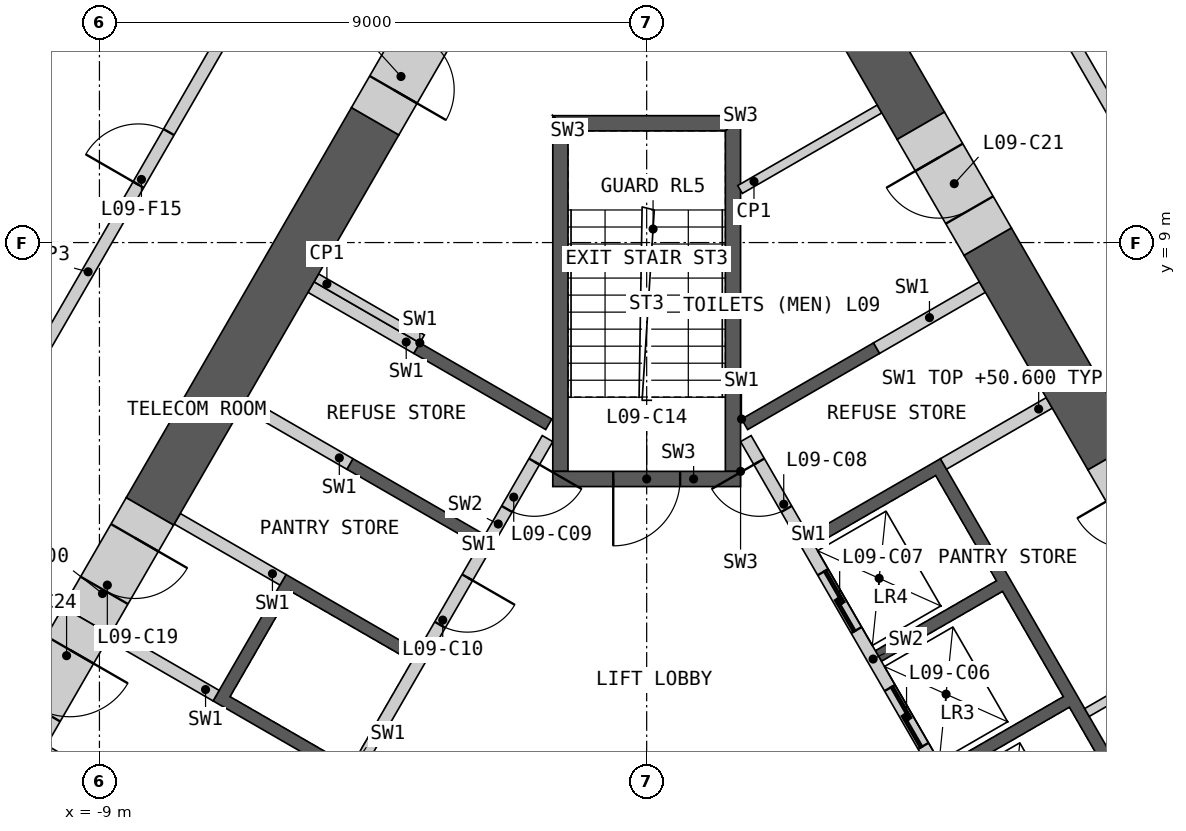
"""IFC4 building model, lengths in metres.
Left out: names, types, materials, properties, quantities, classifications, styles, units other than length and angle.
Written with IfcOpenShell. Run it as: python <this file> out.ifc"""

import sys

from ifc_helpers import new_model, si_unit, direction, frame, frame_2d, origin, place, context, subcontext, project, spatial, polyline, rectangle, outline, extrude, element, fill, save


model = new_model("IFC4")
c1 = context("Model", 3, precision=1e-05, world=origin(), true_north=direction((0.0, 1.0)))
c2 = subcontext(c1, "Body", "Model", "MODEL_VIEW")
j1 = project(units=[si_unit("LENGTHUNIT", "METRE"), si_unit("PLANEANGLEUNIT", "RADIAN")], contexts=[c1])
p1 = place(None, origin())
s1 = spatial("IfcSite", under=j1, at=p1, CompositionType="ELEMENT")
p2 = place(p1, origin())
s2 = spatial("IfcBuilding", under=s1, at=p2, CompositionType="ELEMENT")
p3 = place(p2, frame((0.0, 0.0, 46.8)))
s3 = spatial("IfcBuildingStorey", under=s2, at=p3, CompositionType="ELEMENT", Elevation=46.8)
p4 = place(p3, origin())
e1 = element("IfcWall", 1, at=p4, inside=s3, PredefinedType="SHEAR", context=c2, shape_type="SweptSolid", body=[
    extrude(outline(polyline([(1.561, 6.097), (3.731, 7.35), (3.831, 7.177), (1.66, 5.924), (1.561, 6.097)])), origin(), (0.0, 0.0, 1.0), 3.8),
])
p5 = place(p3, origin())
e2 = element("IfcWall", 2, at=p5, inside=s3, PredefinedType="SHEAR", context=c2, shape_type="SweptSolid", body=[
    extrude(outline(polyline([(2.66, 4.192), (4.831, 5.445), (8.231, -0.444), (6.061, -1.697), (5.96, -1.524), (7.952, -0.374), (6.952, 1.358), (4.96, 0.208), (4.861, 0.381), (6.852, 1.531), (5.852, 3.263), (3.861, 2.113), (3.76, 2.287), (5.752, 3.437), (4.752, 5.169), (2.76, 4.019), (2.66, 4.192)])), origin(), (0.0, 0.0, 1.0), 3.8),
])
p6 = place(p3, frame((5.817, -1.476, 0.0), z_axis=(0.0, 0.0, 1.0), x_axis=(-0.500002616675, 0.866023893041, 0.0)))
e3 = element("IfcWall", 3, at=p6, inside=s3, PredefinedType="SOLIDWALL", context=c2, shape_type="SweptSolid", body=[
    extrude(rectangle(XDim=8.373, YDim=0.2, at=frame_2d((4.187, 0.0))), origin(), (0.0, 0.0, 1.0), 3.8),
])
p7 = place(p6, frame((0.337, 0.0, 0.0)))
e4 = element("IfcOpeningElement", 4, at=p7, cuts=e3, PredefinedType="OPENING", context=c2, shape_type="SweptSolid", body=[
    extrude(rectangle(XDim=1.1, YDim=2.1, at=frame_2d((0.55, 1.05))), frame((0.0, 0.11, 0.0), z_axis=(0.0, -1.0, 0.0), x_axis=(1.0, 0.0, 0.0)), (0.0, 0.0, 1.0), 0.22),
])
p8 = place(p6, frame((2.537, 0.0, 0.0)))
e5 = element("IfcOpeningElement", 5, at=p8, cuts=e3, PredefinedType="OPENING", context=c2, shape_type="SweptSolid", body=[
    extrude(rectangle(XDim=1.1, YDim=2.1, at=frame_2d((0.55, 1.05))), frame((0.0, 0.11, 0.0), z_axis=(0.0, -1.0, 0.0), x_axis=(1.0, 0.0, 0.0)), (0.0, 0.0, 1.0), 0.22),
])
p9 = place(p6, frame((4.737, 0.0, 0.0)))
e6 = element("IfcOpeningElement", 6, at=p9, cuts=e3, PredefinedType="OPENING", context=c2, shape_type="SweptSolid", body=[
    extrude(rectangle(XDim=1.1, YDim=2.1, at=frame_2d((0.55, 1.05))), frame((0.0, 0.11, 0.0), z_axis=(0.0, -1.0, 0.0), x_axis=(1.0, 0.0, 0.0)), (0.0, 0.0, 1.0), 0.22),
])
p10 = place(p6, frame((7.037, 0.0, 0.0)))
e7 = element("IfcOpeningElement", 7, at=p10, cuts=e3, PredefinedType="OPENING", context=c2, shape_type="SweptSolid", body=[
    extrude(rectangle(XDim=0.9, YDim=2.1, at=frame_2d((0.45, 1.05))), frame((0.0, 0.11, 0.0), z_axis=(0.0, -1.0, 0.0), x_axis=(1.0, 0.0, 0.0)), (0.0, 0.0, 1.0), 0.22),
])
p11 = place(p3, frame((4.881, 5.358, 0.0), z_axis=(0.0, 0.0, 1.0), x_axis=(0.866035824272, 0.499981950752, 0.0)))
e8 = element("IfcWall", 8, at=p11, inside=s3, PredefinedType="SHEAR", context=c2, shape_type="SweptSolid", body=[
    extrude(rectangle(XDim=2.009, YDim=0.2, at=frame_2d((1.004, 0.0))), origin(), (0.0, 0.0, 1.0), 3.8),
])
p12 = place(p3, frame((3.781, 7.263, 0.0), z_axis=(0.0, 0.0, 1.0), x_axis=(0.865983199114, 0.50007309351, 0.0)))
e9 = element("IfcWall", 9, at=p12, inside=s3, PredefinedType="SHEAR", context=c2, shape_type="SweptSolid", body=[
    extrude(rectangle(XDim=2.009, YDim=0.2, at=frame_2d((1.004, 0.0))), origin(), (0.0, 0.0, 1.0), 3.8),
])
p13 = place(p3, origin())
e10 = element("IfcWall", 10, at=p13, inside=s3, PredefinedType="SHEAR", context=c2, shape_type="SweptSolid", body=[
    extrude(outline(polyline([(-4.96, 0.208), (-7.131, 1.461), (-5.931, 3.54), (-3.76, 2.287), (-3.861, 2.113), (-5.852, 3.263), (-6.852, 1.531), (-4.861, 0.381), (-4.96, 0.208)])), origin(), (0.0, 0.0, 1.0), 3.8),
])
p14 = place(p3, origin())
e11 = element("IfcWall", 11, at=p14, inside=s3, PredefinedType="SHEAR", context=c2, shape_type="SweptSolid", body=[
    extrude(outline(polyline([(-2.76, 4.019), (-4.931, 5.272), (-4.831, 5.445), (-2.66, 4.192), (-2.76, 4.019)])), origin(), (0.0, 0.0, 1.0), 3.8),
])
p15 = place(p3, origin())
e12 = element("IfcWall", 12, at=p15, inside=s3, PredefinedType="SHEAR", context=c2, shape_type="SweptSolid", body=[
    extrude(outline(polyline([(-3.731, 7.35), (-1.561, 6.097), (-1.66, 5.924), (-3.831, 7.177), (-3.731, 7.35)])), origin(), (0.0, 0.0, 1.0), 3.8),
])
p16 = place(p3, frame((-1.631, 5.776, 0.0), z_axis=(0.0, 0.0, 1.0), x_axis=(-0.499992876559, -0.866029516466, 0.0)))
e13 = element("IfcWall", 13, at=p16, inside=s3, PredefinedType="SOLIDWALL", context=c2, shape_type="SweptSolid", body=[
    extrude(rectangle(XDim=6.486, YDim=0.2, at=frame_2d((3.243, 0.0))), origin(), (0.0, 0.0, 1.0), 3.8),
])
p17 = place(p16, frame((0.437, 0.0, 0.0)))
e14 = element("IfcOpeningElement", 14, at=p17, cuts=e13, PredefinedType="OPENING", context=c2, shape_type="SweptSolid", body=[
    extrude(rectangle(XDim=0.9, YDim=2.1, at=frame_2d((0.45, 1.05))), frame((0.0, 0.11, 0.0), z_axis=(0.0, -1.0, 0.0), x_axis=(1.0, 0.0, 0.0)), (0.0, 0.0, 1.0), 0.22),
])
p18 = place(p16, frame((2.637, 0.0, 0.0)))
e15 = element("IfcOpeningElement", 15, at=p18, cuts=e13, PredefinedType="OPENING", context=c2, shape_type="SweptSolid", body=[
    extrude(rectangle(XDim=0.9, YDim=2.1, at=frame_2d((0.45, 1.05))), frame((0.0, 0.11, 0.0), z_axis=(0.0, -1.0, 0.0), x_axis=(1.0, 0.0, 0.0)), (0.0, 0.0, 1.0), 0.22),
])
p19 = place(p3, frame((-3.781, 7.263, 0.0), z_axis=(0.0, 0.0, 1.0), x_axis=(-0.865983199114, 0.50007309351, 0.0)))
e16 = element("IfcWall", 16, at=p19, inside=s3, PredefinedType="SHEAR", context=c2, shape_type="SweptSolid", body=[
    extrude(rectangle(XDim=2.009, YDim=0.2, at=frame_2d((1.004, 0.0))), origin(), (0.0, 0.0, 1.0), 3.8),
])
p20 = place(p3, frame((-4.881, 5.358, 0.0), z_axis=(0.0, 0.0, 1.0), x_axis=(-0.866035824272, 0.499981950752, 0.0)))
e17 = element("IfcWall", 17, at=p20, inside=s3, PredefinedType="SHEAR", context=c2, shape_type="SweptSolid", body=[
    extrude(rectangle(XDim=2.009, YDim=0.2, at=frame_2d((1.004, 0.0))), origin(), (0.0, 0.0, 1.0), 3.8),
])
p21 = place(p3, frame((-5.981, 3.453, 0.0), z_axis=(0.0, 0.0, 1.0), x_axis=(-0.866013584312, 0.500020471368, 0.0)))
e18 = element("IfcWall", 18, at=p21, inside=s3, PredefinedType="SHEAR", context=c2, shape_type="SweptSolid", body=[
    extrude(rectangle(XDim=2.009, YDim=0.2, at=frame_2d((1.005, 0.0))), origin(), (0.0, 0.0, 1.0), 3.8),
])
p22 = place(p3, frame((-7.081, 1.548, 0.0), z_axis=(0.0, 0.0, 1.0), x_axis=(-0.865983199114, 0.50007309351, 0.0)))
e19 = element("IfcWall", 19, at=p22, inside=s3, PredefinedType="SHEAR", context=c2, shape_type="SweptSolid", body=[
    extrude(rectangle(XDim=2.009, YDim=0.2, at=frame_2d((1.004, 0.0))), origin(), (0.0, 0.0, 1.0), 3.8),
])
p23 = place(p3, frame((-8.181, -0.357, 0.0), z_axis=(0.0, 0.0, 1.0), x_axis=(-0.866035824272, 0.499981950752, 0.0)))
e20 = element("IfcWall", 20, at=p23, inside=s3, PredefinedType="SHEAR", context=c2, shape_type="SweptSolid", body=[
    extrude(rectangle(XDim=2.009, YDim=0.2, at=frame_2d((1.004, 0.0))), origin(), (0.0, 0.0, 1.0), 3.8),
])
p24 = place(p3, origin())
e21 = element("IfcWall", 21, at=p24, inside=s3, PredefinedType="SHEAR", context=c2, shape_type="SweptSolid", body=[
    extrude(outline(polyline([(1.544, 5.237), (1.544, 11.087), (1.294, 10.837), (1.294, 5.237), (1.544, 5.237)])), origin(), (0.0, 0.0, 1.0), 3.8),
])
p25 = place(p3, origin())
e22 = element("IfcWall", 22, at=p25, inside=s3, PredefinedType="SHEAR", context=c2, shape_type="SweptSolid", body=[
    extrude(outline(polyline([(1.544, 11.087), (-1.544, 11.087), (-1.294, 10.837), (1.294, 10.837), (1.544, 11.087)])), origin(), (0.0, 0.0, 1.0), 3.8),
])
p26 = place(p3, origin())
e23 = element("IfcWall", 23, at=p26, inside=s3, PredefinedType="SHEAR", context=c2, shape_type="SweptSolid", body=[
    extrude(outline(polyline([(-1.294, 10.837), (-1.544, 11.087), (-1.544, 5.237), (-1.294, 5.237), (-1.294, 10.837)])), origin(), (0.0, 0.0, 1.0), 3.8),
])
p27 = place(p3, frame((1.544, 5.112, 0.0), z_axis=(0.0, 0.0, 1.0), x_axis=(-1.0, 0.0, 0.0)))
e24 = element("IfcWall", 24, at=p27, inside=s3, PredefinedType="SHEAR", context=c2, shape_type="SweptSolid", body=[
    extrude(rectangle(XDim=3.088, YDim=0.25, at=frame_2d((1.544, 0.0))), origin(), (0.0, 0.0, 1.0), 3.8),
])
p28 = place(p27, frame((0.994, 0.0, 0.0)))
e25 = element("IfcOpeningElement", 25, at=p28, cuts=e24, PredefinedType="OPENING", context=c2, shape_type="SweptSolid", body=[
    extrude(rectangle(XDim=1.1, YDim=2.1, at=frame_2d((0.55, 1.05))), frame((0.0, 0.135, 0.0), z_axis=(0.0, -1.0, 0.0), x_axis=(1.0, 0.0, 0.0)), (0.0, 0.0, 1.0), 0.27),
])
p29 = place(p3, frame((-3.693, 7.415, 0.0), z_axis=(0.0, 0.0, 1.0), x_axis=(-0.866035824272, 0.499981950752, 0.0)))
e26 = element("IfcWall", 26, at=p29, inside=s3, PredefinedType="PARTITIONING", context=c2, shape_type="SweptSolid", body=[
    extrude(rectangle(XDim=2.009, YDim=0.15, at=frame_2d((1.004, 0.0))), origin(), (0.0, 0.0, 1.0), 3.8),
])
p30 = place(p3, frame((3.829, 11.197, 0.0), z_axis=(0.0, 0.0, 1.0), x_axis=(-0.866016748302, -0.500014991436, 0.0)))
e27 = element("IfcWall", 27, at=p30, inside=s3, PredefinedType="PARTITIONING", context=c2, shape_type="SweptSolid", body=[
    extrude(rectangle(XDim=2.649, YDim=0.15, at=frame_2d((1.324, 0.0))), origin(), (0.0, 0.0, 1.0), 3.8),
])
p31 = place(p3, frame((8.981, 2.275, 0.0), z_axis=(0.0, 0.0, 1.0), x_axis=(-0.866013584312, -0.500020471368, 0.0)))
e28 = element("IfcWall", 28, at=p31, inside=s3, PredefinedType="PARTITIONING", context=c2, shape_type="SweptSolid", body=[
    extrude(rectangle(XDim=2.009, YDim=0.15, at=frame_2d((1.005, 0.0))), origin(), (0.0, 0.0, 1.0), 3.8),
])
p32 = place(p3, frame((7.646, 5.486, 0.0), z_axis=(0.0, 0.0, 1.0), x_axis=(-0.499978218965, 0.866037978706, 0.0)))
e29 = element("IfcWall", 29, at=p32, inside=s3, PredefinedType="SHEAR", context=c2, shape_type="SweptSolid", body=[
    extrude(rectangle(XDim=4.076, YDim=0.9, at=frame_2d((2.038, 0.0))), origin(), (0.0, 0.0, 1.0), 3.8),
])
p33 = place(p3, frame((4.509, 10.921, 0.0), z_axis=(0.0, 0.0, 1.0), x_axis=(-0.49999004381, 0.866031151917, 0.0)))
e30 = element("IfcWall", 30, at=p33, inside=s3, PredefinedType="SHEAR", context=c2, shape_type="SweptSolid", body=[
    extrude(rectangle(XDim=3.975, YDim=0.9, at=frame_2d((1.988, 0.0))), origin(), (0.0, 0.0, 1.0), 3.8),
])
p34 = place(p3, frame((-4.466, 10.995, 0.0), z_axis=(0.0, 0.0, 1.0), x_axis=(-0.500012427149, -0.866018228848, 0.0)))
e31 = element("IfcWall", 31, at=p34, inside=s3, PredefinedType="SHEAR", context=c2, shape_type="SweptSolid", body=[
    extrude(rectangle(XDim=7.409, YDim=0.9, at=frame_2d((3.705, 0.0))), origin(), (0.0, 0.0, 1.0), 3.8),
])
p35 = place(p3, frame((-8.17, 4.579, 0.0), z_axis=(0.0, 0.0, 1.0), x_axis=(-0.499888406853, -0.866089822532, 0.0)))
e32 = element("IfcWall", 32, at=p35, inside=s3, PredefinedType="SHEAR", context=c2, shape_type="SweptSolid", body=[
    extrude(rectangle(XDim=2.08, YDim=0.9, at=frame_2d((1.04, 0.0))), origin(), (0.0, 0.0, 1.0), 3.8),
])
p36 = place(p35, frame((0.5, 0.0, 0.0)))
e33 = element("IfcOpeningElement", 33, at=p36, cuts=e32, PredefinedType="OPENING", context=c2, shape_type="SweptSolid", body=[
    extrude(rectangle(XDim=1.0, YDim=2.1, at=frame_2d((0.5, 1.05))), frame((0.0, 0.46, 0.0), z_axis=(0.0, -1.0, 0.0), x_axis=(1.0, 0.0, 0.0)), (0.0, 0.0, 1.0), 0.92),
])
p37 = place(p3, frame((8.747, 3.58, 0.0), z_axis=(0.0, 0.0, 1.0), x_axis=(-0.50002983664, 0.866008176907, 0.0)))
e34 = element("IfcWall", 34, at=p37, inside=s3, PredefinedType="SHEAR", context=c2, shape_type="SweptSolid", body=[
    extrude(rectangle(XDim=2.2, YDim=0.9, at=frame_2d((1.1, 0.0))), origin(), (0.0, 0.0, 1.0), 3.8),
])
p38 = place(p37, frame((0.6, 0.0, 0.0)))
e35 = element("IfcOpeningElement", 35, at=p38, cuts=e34, PredefinedType="OPENING", context=c2, shape_type="SweptSolid", body=[
    extrude(rectangle(XDim=1.0, YDim=2.1, at=frame_2d((0.5, 1.05))), frame((0.0, 0.46, 0.0), z_axis=(0.0, -1.0, 0.0), x_axis=(1.0, 0.0, 0.0)), (0.0, 0.0, 1.0), 0.92),
])
p39 = place(p3, frame((5.608, 9.016, 0.0), z_axis=(0.0, 0.0, 1.0), x_axis=(-0.499994660107, 0.866028486751, 0.0)))
e36 = element("IfcWall", 36, at=p39, inside=s3, PredefinedType="SHEAR", context=c2, shape_type="SweptSolid", body=[
    extrude(rectangle(XDim=2.2, YDim=0.9, at=frame_2d((1.1, 0.0))), origin(), (0.0, 0.0, 1.0), 3.8),
])
p40 = place(p39, frame((0.6, 0.0, 0.0)))
e37 = element("IfcOpeningElement", 37, at=p40, cuts=e36, PredefinedType="OPENING", context=c2, shape_type="SweptSolid", body=[
    extrude(rectangle(XDim=1.0, YDim=2.1, at=frame_2d((0.5, 1.05))), frame((0.0, 0.46, 0.0), z_axis=(0.0, -1.0, 0.0), x_axis=(1.0, 0.0, 0.0)), (0.0, 0.0, 1.0), 0.92),
])
p41 = place(p3, frame((-3.365, 12.9, 0.0), z_axis=(0.0, 0.0, 1.0), x_axis=(-0.500077893725, -0.86598042715, 0.0)))
e38 = element("IfcWall", 38, at=p41, inside=s3, PredefinedType="SHEAR", context=c2, shape_type="SweptSolid", body=[
    extrude(rectangle(XDim=2.2, YDim=0.9, at=frame_2d((1.1, 0.0))), origin(), (0.0, 0.0, 1.0), 3.8),
])
p42 = place(p41, frame((0.6, 0.0, 0.0)))
e39 = element("IfcOpeningElement", 39, at=p42, cuts=e38, PredefinedType="OPENING", context=c2, shape_type="SweptSolid", body=[
    extrude(rectangle(XDim=1.0, YDim=2.1, at=frame_2d((0.5, 1.05))), frame((0.0, 0.46, 0.0), z_axis=(0.0, -1.0, 0.0), x_axis=(1.0, 0.0, 0.0)), (0.0, 0.0, 1.0), 0.92),
])
p43 = place(p3, frame((-9.21, 2.777, 0.0), z_axis=(0.0, 0.0, 1.0), x_axis=(-0.500077893725, -0.86598042715, 0.0)))
e40 = element("IfcWall", 40, at=p43, inside=s3, PredefinedType="SHEAR", context=c2, shape_type="SweptSolid", body=[
    extrude(rectangle(XDim=2.2, YDim=0.9, at=frame_2d((1.1, 0.0))), origin(), (0.0, 0.0, 1.0), 3.8),
])
p44 = place(p43, frame((0.55, 0.0, 0.0)))
e41 = element("IfcOpeningElement", 41, at=p44, cuts=e40, PredefinedType="OPENING", context=c2, shape_type="SweptSolid", body=[
    extrude(rectangle(XDim=1.1, YDim=2.1, at=frame_2d((0.55, 1.05))), frame((0.0, 0.46, 0.0), z_axis=(0.0, -1.0, 0.0), x_axis=(1.0, 0.0, 0.0)), (0.0, 0.0, 1.0), 0.92),
])
p45 = place(p3, frame((-10.439, 6.35, 0.0), z_axis=(0.0, 0.0, 1.0), x_axis=(0.50001002959, 0.86601961312, 0.0)))
e42 = element("IfcWall", 42, at=p45, inside=s3, PredefinedType="PARTITIONING", context=c2, shape_type="SweptSolid", body=[
    extrude(rectangle(XDim=10.019, YDim=0.2, at=frame_2d((5.009, 0.0))), origin(), (0.0, 0.0, 1.0), 3.8),
])
p46 = place(p45, frame((4.159, 0.0, 0.0)))
e43 = element("IfcOpeningElement", 43, at=p46, cuts=e42, PredefinedType="OPENING", context=c2, shape_type="SweptSolid", body=[
    extrude(rectangle(XDim=1.0, YDim=2.1, at=frame_2d((0.5, 1.05))), frame((0.0, 0.11, 0.0), z_axis=(0.0, -1.0, 0.0), x_axis=(1.0, 0.0, 0.0)), (0.0, 0.0, 1.0), 0.22),
])
p47 = place(p3, frame((5.429, 15.026, 0.0), z_axis=(0.0, 0.0, 1.0), x_axis=(0.50001002959, -0.86601961312, 0.0)))
e44 = element("IfcWall", 44, at=p47, inside=s3, PredefinedType="PARTITIONING", context=c2, shape_type="SweptSolid", body=[
    extrude(rectangle(XDim=10.019, YDim=0.2, at=frame_2d((5.009, 0.0))), origin(), (0.0, 0.0, 1.0), 3.8),
])
p48 = place(p47, frame((4.86, 0.0, 0.0)))
e45 = element("IfcOpeningElement", 45, at=p48, cuts=e44, PredefinedType="OPENING", context=c2, shape_type="SweptSolid", body=[
    extrude(rectangle(XDim=1.0, YDim=2.1, at=frame_2d((0.5, 1.05))), frame((0.0, 0.11, 0.0), z_axis=(0.0, -1.0, 0.0), x_axis=(1.0, 0.0, 0.0)), (0.0, 0.0, 1.0), 0.22),
])
p49 = place(p8, origin())
e46 = element("IfcDoor", 46, at=p49, inside=s3, OperationType="SLIDING_TO_LEFT", PredefinedType="DOOR", context=c2, shape_type="SweptSolid", body=[
    extrude(rectangle(XDim=1.1, YDim=2.1, at=frame_2d((0.55, 1.05))), frame((0.0, 0.025, 0.0), z_axis=(0.0, -1.0, 0.0), x_axis=(1.0, 0.0, 0.0)), (0.0, 0.0, 1.0), 0.05),
])
fill(e5, e46)
p50 = place(p9, origin())
e47 = element("IfcDoor", 47, at=p50, inside=s3, OperationType="SLIDING_TO_LEFT", PredefinedType="DOOR", context=c2, shape_type="SweptSolid", body=[
    extrude(rectangle(XDim=1.1, YDim=2.1, at=frame_2d((0.55, 1.05))), frame((0.0, 0.025, 0.0), z_axis=(0.0, -1.0, 0.0), x_axis=(1.0, 0.0, 0.0)), (0.0, 0.0, 1.0), 0.05),
])
fill(e6, e47)
p51 = place(p10, origin())
e48 = element("IfcDoor", 48, at=p51, inside=s3, OperationType="SINGLE_SWING_RIGHT", PredefinedType="DOOR", context=c2, shape_type="SweptSolid", body=[
    extrude(rectangle(XDim=0.9, YDim=2.1, at=frame_2d((0.45, 1.05))), frame((0.0, 0.025, 0.0), z_axis=(0.0, -1.0, 0.0), x_axis=(1.0, 0.0, 0.0)), (0.0, 0.0, 1.0), 0.05),
])
fill(e7, e48)
p52 = place(p17, origin())
e49 = element("IfcDoor", 49, at=p52, inside=s3, OperationType="SINGLE_SWING_LEFT", PredefinedType="DOOR", context=c2, shape_type="SweptSolid", body=[
    extrude(rectangle(XDim=0.9, YDim=2.1, at=frame_2d((0.45, 1.05))), frame((0.0, 0.025, 0.0), z_axis=(0.0, -1.0, 0.0), x_axis=(1.0, 0.0, 0.0)), (0.0, 0.0, 1.0), 0.05),
])
fill(e14, e49)
p53 = place(p18, origin())
e50 = element("IfcDoor", 50, at=p53, inside=s3, OperationType="SINGLE_SWING_LEFT", PredefinedType="DOOR", context=c2, shape_type="SweptSolid", body=[
    extrude(rectangle(XDim=0.9, YDim=2.1, at=frame_2d((0.45, 1.05))), frame((0.0, 0.025, 0.0), z_axis=(0.0, -1.0, 0.0), x_axis=(1.0, 0.0, 0.0)), (0.0, 0.0, 1.0), 0.05),
])
fill(e15, e50)
p54 = place(p28, origin())
e51 = element("IfcDoor", 51, at=p54, inside=s3, OperationType="SINGLE_SWING_RIGHT", PredefinedType="DOOR", context=c2, shape_type="SweptSolid", body=[
    extrude(rectangle(XDim=1.1, YDim=2.1, at=frame_2d((0.55, 1.05))), frame((0.0, 0.025, 0.0), z_axis=(0.0, -1.0, 0.0), x_axis=(1.0, 0.0, 0.0)), (0.0, 0.0, 1.0), 0.05),
])
fill(e25, e51)
p55 = place(p36, origin())
e52 = element("IfcDoor", 52, at=p55, inside=s3, OperationType="SINGLE_SWING_LEFT", PredefinedType="DOOR", context=c2, shape_type="SweptSolid", body=[
    extrude(rectangle(XDim=1.0, YDim=2.1, at=frame_2d((0.5, 1.05))), frame((0.0, 0.205, 0.0), z_axis=(0.0, -1.0, 0.0), x_axis=(1.0, 0.0, 0.0)), (0.0, 0.0, 1.0), 0.05),
])
fill(e33, e52)
p56 = place(p40, origin())
e53 = element("IfcDoor", 53, at=p56, inside=s3, OperationType="SINGLE_SWING_RIGHT", PredefinedType="DOOR", context=c2, shape_type="SweptSolid", body=[
    extrude(rectangle(XDim=1.0, YDim=2.1, at=frame_2d((0.5, 1.05))), frame((0.0, 0.205, 0.0), z_axis=(0.0, -1.0, 0.0), x_axis=(1.0, 0.0, 0.0)), (0.0, 0.0, 1.0), 0.05),
])
fill(e37, e53)
p57 = place(p42, origin())
e54 = element("IfcDoor", 54, at=p57, inside=s3, OperationType="SINGLE_SWING_RIGHT", PredefinedType="DOOR", context=c2, shape_type="SweptSolid", body=[
    extrude(rectangle(XDim=1.0, YDim=2.1, at=frame_2d((0.5, 1.05))), frame((0.0, 0.205, 0.0), z_axis=(0.0, -1.0, 0.0), x_axis=(1.0, 0.0, 0.0)), (0.0, 0.0, 1.0), 0.05),
])
fill(e39, e54)
p58 = place(p44, origin())
e55 = element("IfcDoor", 55, at=p58, inside=s3, OperationType="SINGLE_SWING_LEFT", PredefinedType="DOOR", context=c2, shape_type="SweptSolid", body=[
    extrude(rectangle(XDim=1.1, YDim=2.1, at=frame_2d((0.55, 1.05))), frame((0.0, 0.205, 0.0), z_axis=(0.0, -1.0, 0.0), x_axis=(1.0, 0.0, 0.0)), (0.0, 0.0, 1.0), 0.05),
])
fill(e41, e55)
p59 = place(p46, origin())
e56 = element("IfcDoor", 56, at=p59, inside=s3, OperationType="SINGLE_SWING_LEFT", PredefinedType="DOOR", context=c2, shape_type="SweptSolid", body=[
    extrude(rectangle(XDim=1.0, YDim=2.1, at=frame_2d((0.5, 1.05))), frame((0.0, 0.025, 0.0), z_axis=(0.0, -1.0, 0.0), x_axis=(1.0, 0.0, 0.0)), (0.0, 0.0, 1.0), 0.05),
])
fill(e43, e56)
save(model, sys.argv[1])
